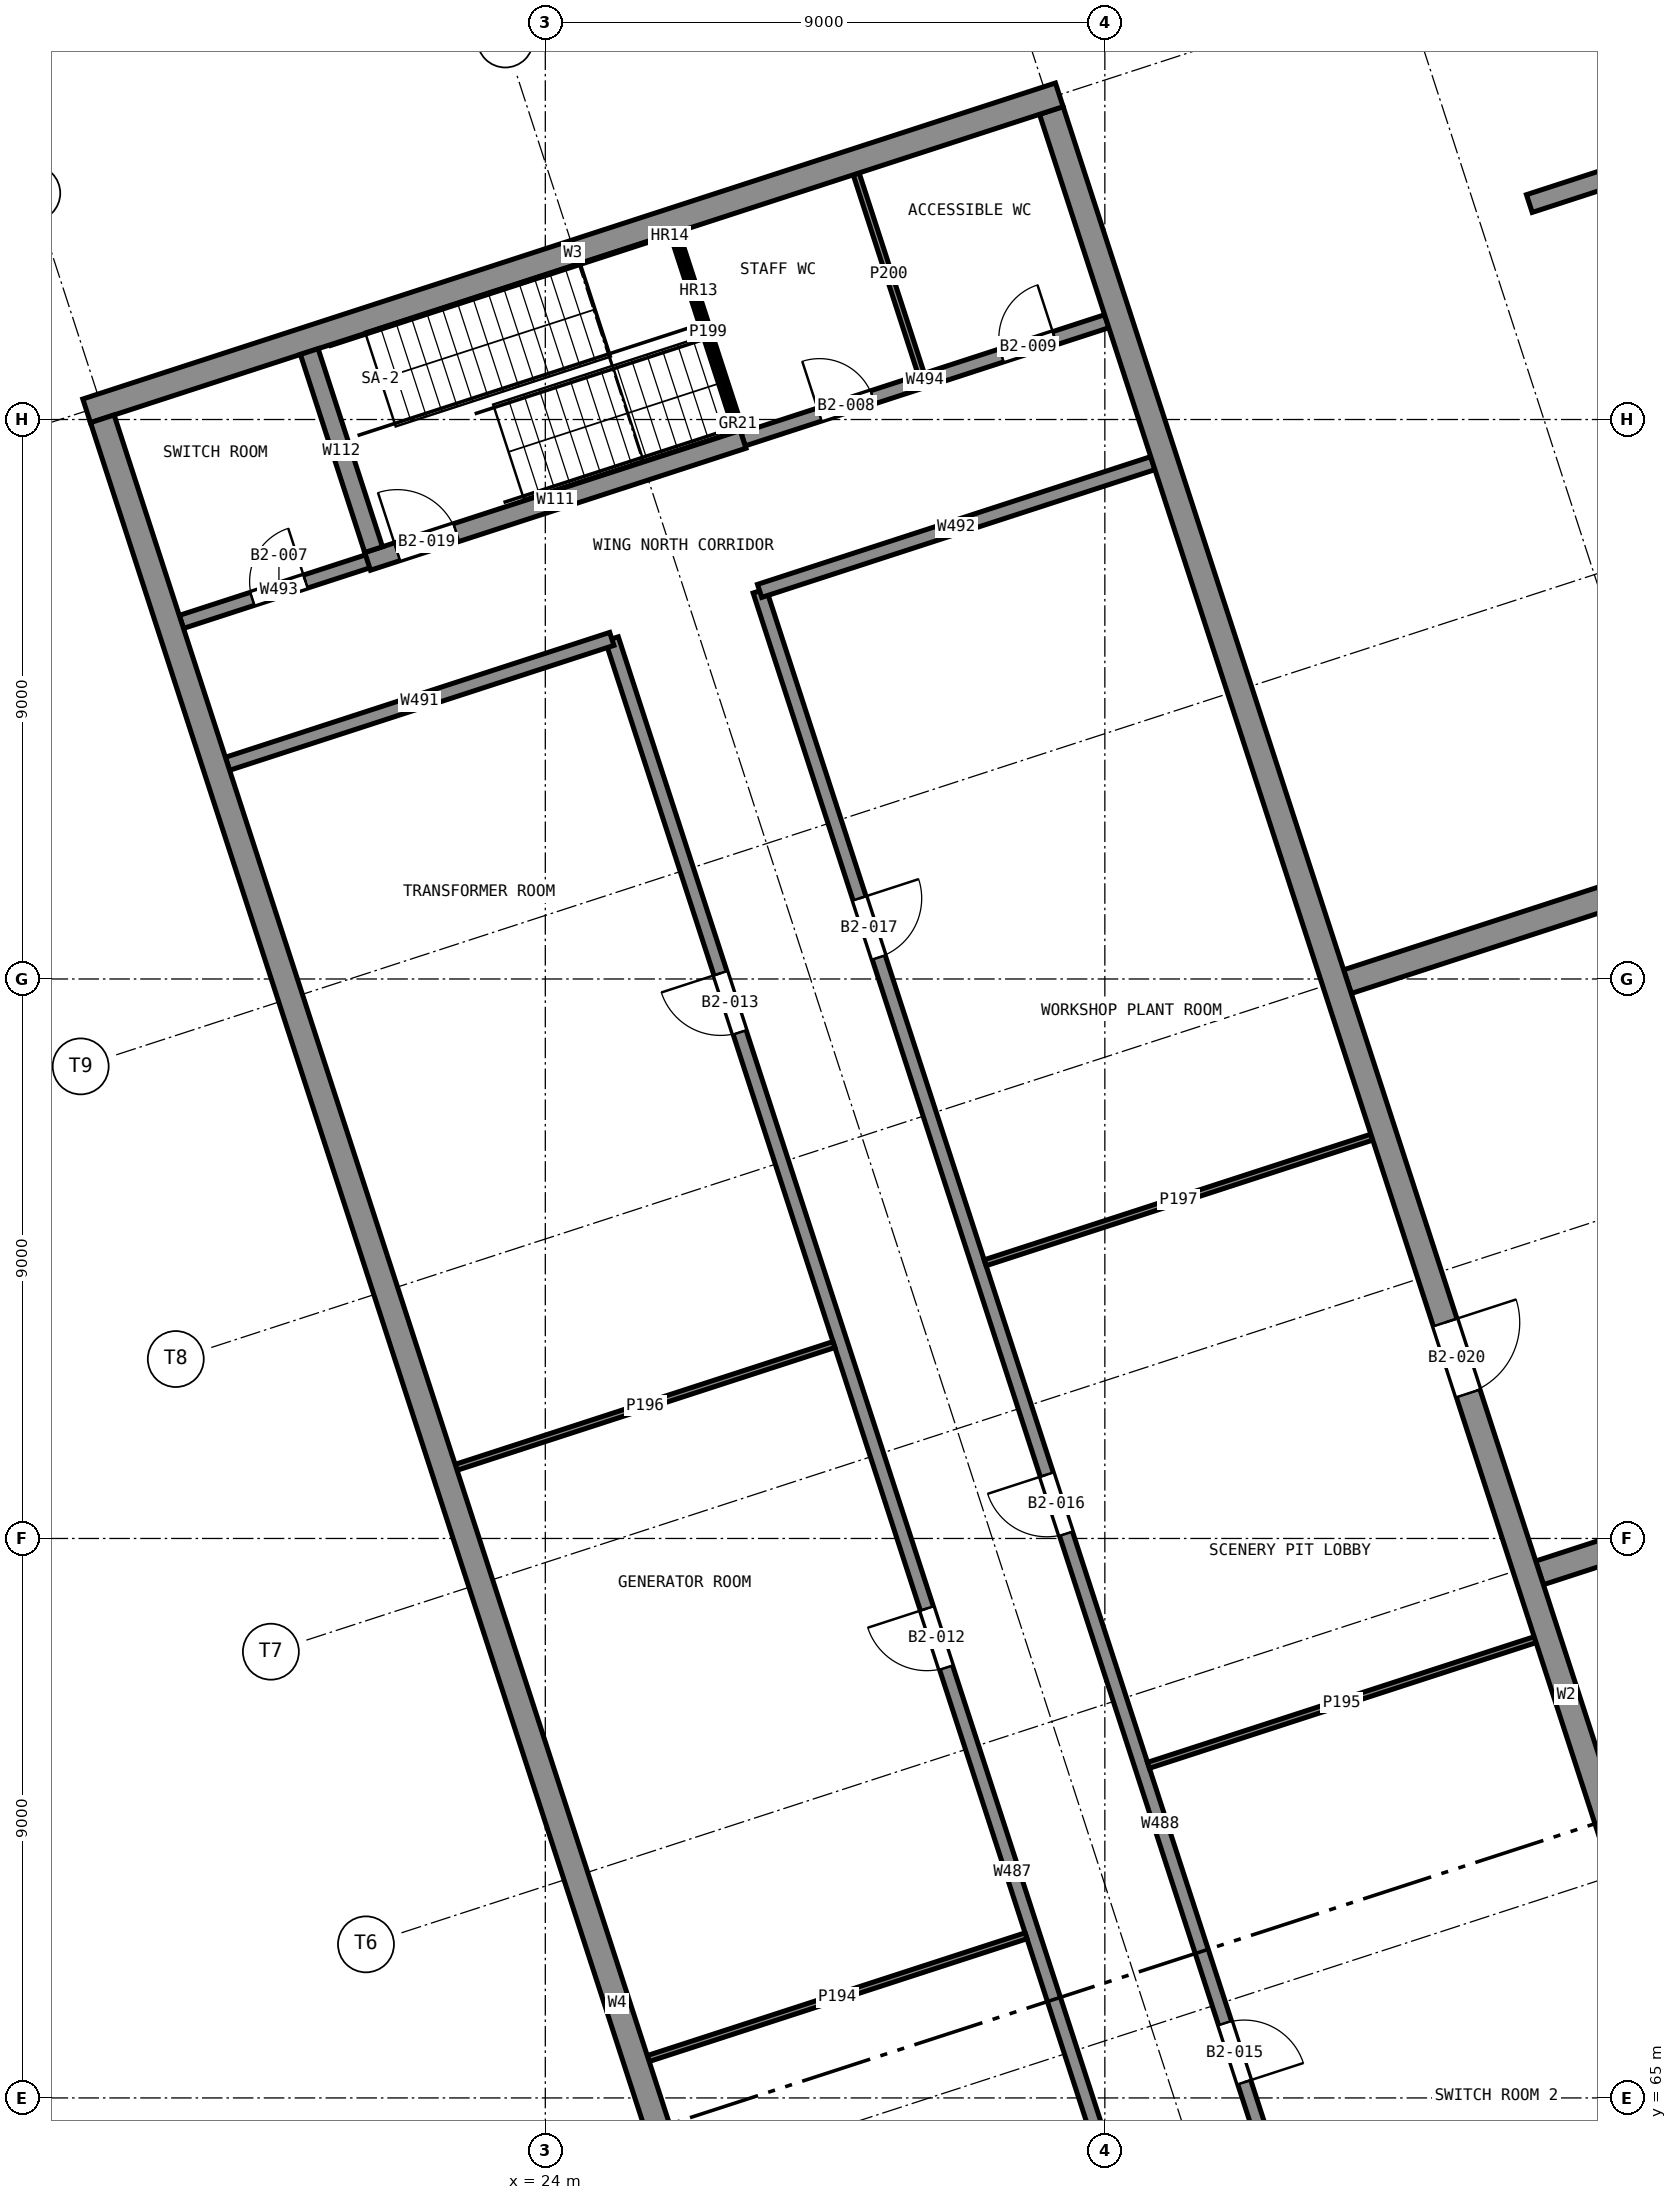
"""IFC4 building model, lengths in metres.
Left out: names, types, materials, properties, quantities, classifications, styles, units other than length and angle.
Written with IfcOpenShell. Run it as: python <this file> out.ifc"""

import sys

from ifc_helpers import new_model, si_unit, direction, frame, frame_2d, origin, place, context, subcontext, project, spatial, rectangle, extrude, element, fill, save


model = new_model("IFC4")
c1 = context("Model", 3, precision=1e-05, world=origin(), true_north=direction((0.0, 1.0)))
c2 = subcontext(c1, "Body", "Model", "MODEL_VIEW")
j1 = project(units=[si_unit("LENGTHUNIT", "METRE"), si_unit("PLANEANGLEUNIT", "RADIAN")], contexts=[c1])
p1 = place(None, origin())
s1 = spatial("IfcSite", under=j1, at=p1, CompositionType="ELEMENT")
p2 = place(p1, origin())
s2 = spatial("IfcBuilding", under=s1, at=p2, CompositionType="ELEMENT")
p3 = place(p2, frame((0.0, 0.0, -10.0)))
s3 = spatial("IfcBuildingStorey", under=s2, at=p3, CompositionType="ELEMENT", Elevation=-10.0)
p4 = place(p3, frame((48.702, 45.994, 0.0), z_axis=(0.0, 0.0, 1.0), x_axis=(-0.309016036191, 0.951056827627, 0.0)))
e1 = element("IfcWall", 1, at=p4, inside=s3, PredefinedType="SOLIDWALL", context=c2, shape_type="SweptSolid", body=[
    extrude(rectangle(XDim=53.6, YDim=0.4, at=frame_2d((26.8, 0.0))), origin(), (0.0, 0.0, 1.0), 5.0),
])
p5 = place(p4, frame((31.9, 0.0, 0.0)))
e2 = element("IfcOpeningElement", 2, at=p5, cuts=e1, PredefinedType="OPENING", context=c2, shape_type="SweptSolid", body=[
    extrude(rectangle(XDim=1.2, YDim=2.1, at=frame_2d((0.6, 1.05))), frame((0.0, 0.21, 0.0), z_axis=(0.0, -1.0, 0.0), x_axis=(1.0, 0.0, 0.0)), (0.0, 0.0, 1.0), 0.42),
])
p6 = place(p3, frame((32.267, 97.223, 0.0), z_axis=(0.0, 0.0, 1.0), x_axis=(-0.951054352744, -0.30902365302, 0.0)))
e3 = element("IfcWall", 3, at=p6, inside=s3, PredefinedType="SOLIDWALL", context=c2, shape_type="SweptSolid", body=[
    extrude(rectangle(XDim=16.45, YDim=0.4, at=frame_2d((8.225, 0.0))), origin(), (0.0, 0.0, 1.0), 5.0),
])
p7 = place(p3, frame((16.874, 92.011, 0.0), z_axis=(0.0, 0.0, 1.0), x_axis=(0.309020156104, -0.951055488981, 0.0)))
e4 = element("IfcWall", 4, at=p7, inside=s3, PredefinedType="SOLIDWALL", context=c2, shape_type="SweptSolid", body=[
    extrude(rectangle(XDim=53.6, YDim=0.4, at=frame_2d((26.8, 0.0))), origin(), (0.0, 0.0, 1.0), 5.0),
])
for number, where, z_axis, x_axis in (
    (5, (39.993, 73.447, 0.0), (0.0, 0.0, 1.0), (0.951, 0.309, 0.0)),
    (6, (46.413, 86.047, 0.0), (0.0, 0.0, 1.0), (-0.951, -0.309, 0.0)),
):
    element("IfcWall", number, at=place(p3, frame(where, z_axis=z_axis, x_axis=x_axis)), inside=s3, PredefinedType="SOLIDWALL", context=c2, shape_type="SweptSolid", body=[
        extrude(rectangle(XDim=10.0, YDim=0.4, at=frame_2d((5.0, 0.0))), origin(), (0.0, 0.0, 1.0), 5.0),
    ])
p8 = place(p3, frame((27.181, 91.68, 0.0), z_axis=(0.0, 0.0, 1.0), x_axis=(-0.951051301895, -0.309033042189, 0.0)))
e7 = element("IfcWall", 7, at=p8, inside=s3, PredefinedType="SOLIDWALL", context=c2, shape_type="SweptSolid", body=[
    extrude(rectangle(XDim=6.35, YDim=0.3, at=frame_2d((3.175, 0.0))), origin(), (0.0, 0.0, 1.0), 4.65),
])
p9 = place(p8, frame((4.85, 0.0, 0.0)))
e8 = element("IfcOpeningElement", 8, at=p9, cuts=e7, PredefinedType="OPENING", context=c2, shape_type="SweptSolid", body=[
    extrude(rectangle(XDim=1.0, YDim=2.1, at=frame_2d((0.5, 1.05))), frame((0.0, 0.16, 0.0), z_axis=(0.0, -1.0, 0.0), x_axis=(1.0, 0.0, 0.0)), (0.0, 0.0, 1.0), 0.32),
])
p10 = place(p3, frame((21.238, 89.907, 0.0), z_axis=(0.0, 0.0, 1.0), x_axis=(-0.309003676349, 0.951060843481, 0.0)))
e9 = element("IfcWall", 9, at=p10, inside=s3, PredefinedType="SOLIDWALL", context=c2, shape_type="SweptSolid", body=[
    extrude(rectangle(XDim=3.35, YDim=0.3, at=frame_2d((1.675, 0.0))), origin(), (0.0, 0.0, 1.0), 4.65),
])
p11 = place(p3, frame((37.956, 48.812, 0.0), z_axis=(0.0, 0.0, 1.0), x_axis=(-0.30901736393, 0.951056396219, 0.0)))
e10 = element("IfcWall", 10, at=p11, inside=s3, PredefinedType="SOLIDWALL", context=c2, shape_type="SweptSolid", body=[
    extrude(rectangle(XDim=41.7, YDim=0.22, at=frame_2d((20.85, 0.0))), origin(), (0.0, 0.0, 1.0), 4.65),
])
p12 = place(p11, frame((2.009, 0.0, 0.0)))
e11 = element("IfcOpeningElement", 11, at=p12, cuts=e10, PredefinedType="OPENING", context=c2, shape_type="SweptSolid", body=[
    extrude(rectangle(XDim=1.0, YDim=2.1, at=frame_2d((0.5, 1.05))), frame((0.0, 0.12, 0.0), z_axis=(0.0, -1.0, 0.0), x_axis=(1.0, 0.0, 0.0)), (0.0, 0.0, 1.0), 0.24),
])
p13 = place(p11, frame((11.495, 0.0, 0.0)))
e12 = element("IfcOpeningElement", 12, at=p13, cuts=e10, PredefinedType="OPENING", context=c2, shape_type="SweptSolid", body=[
    extrude(rectangle(XDim=1.0, YDim=2.1, at=frame_2d((0.5, 1.05))), frame((0.0, 0.12, 0.0), z_axis=(0.0, -1.0, 0.0), x_axis=(1.0, 0.0, 0.0)), (0.0, 0.0, 1.0), 0.24),
])
p14 = place(p11, frame((24.3, 0.0, 0.0)))
e13 = element("IfcOpeningElement", 13, at=p14, cuts=e10, PredefinedType="OPENING", context=c2, shape_type="SweptSolid", body=[
    extrude(rectangle(XDim=1.0, YDim=2.1, at=frame_2d((0.5, 1.05))), frame((0.0, 0.12, 0.0), z_axis=(0.0, -1.0, 0.0), x_axis=(1.0, 0.0, 0.0)), (0.0, 0.0, 1.0), 0.24),
])
p15 = place(p11, frame((35.045, 0.0, 0.0)))
e14 = element("IfcOpeningElement", 14, at=p15, cuts=e10, PredefinedType="OPENING", context=c2, shape_type="SweptSolid", body=[
    extrude(rectangle(XDim=1.0, YDim=2.1, at=frame_2d((0.5, 1.05))), frame((0.0, 0.12, 0.0), z_axis=(0.0, -1.0, 0.0), x_axis=(1.0, 0.0, 0.0)), (0.0, 0.0, 1.0), 0.24),
])
p16 = place(p3, frame((40.333, 49.584, 0.0), z_axis=(0.0, 0.0, 1.0), x_axis=(-0.309015643281, 0.951056955291, 0.0)))
e15 = element("IfcWall", 15, at=p16, inside=s3, PredefinedType="SOLIDWALL", context=c2, shape_type="SweptSolid", body=[
    extrude(rectangle(XDim=41.7, YDim=0.22, at=frame_2d((20.85, 0.0))), origin(), (0.0, 0.0, 1.0), 4.65),
])
p17 = place(p16, frame((5.575, 0.0, 0.0)))
e16 = element("IfcOpeningElement", 16, at=p17, cuts=e15, PredefinedType="OPENING", context=c2, shape_type="SweptSolid", body=[
    extrude(rectangle(XDim=1.0, YDim=2.1, at=frame_2d((0.5, 1.05))), frame((0.0, 0.12, 0.0), z_axis=(0.0, -1.0, 0.0), x_axis=(1.0, 0.0, 0.0)), (0.0, 0.0, 1.0), 0.24),
])
p18 = place(p16, frame((16.475, 0.0, 0.0)))
e17 = element("IfcOpeningElement", 17, at=p18, cuts=e15, PredefinedType="OPENING", context=c2, shape_type="SweptSolid", body=[
    extrude(rectangle(XDim=1.0, YDim=2.1, at=frame_2d((0.5, 1.05))), frame((0.0, 0.12, 0.0), z_axis=(0.0, -1.0, 0.0), x_axis=(1.0, 0.0, 0.0)), (0.0, 0.0, 1.0), 0.24),
])
p19 = place(p16, frame((25.752, 0.0, 0.0)))
e18 = element("IfcOpeningElement", 18, at=p19, cuts=e15, PredefinedType="OPENING", context=c2, shape_type="SweptSolid", body=[
    extrude(rectangle(XDim=1.0, YDim=2.1, at=frame_2d((0.5, 1.05))), frame((0.0, 0.12, 0.0), z_axis=(0.0, -1.0, 0.0), x_axis=(1.0, 0.0, 0.0)), (0.0, 0.0, 1.0), 0.24),
])
p20 = place(p16, frame((35.5, 0.0, 0.0)))
e19 = element("IfcOpeningElement", 19, at=p20, cuts=e15, PredefinedType="OPENING", context=c2, shape_type="SweptSolid", body=[
    extrude(rectangle(XDim=1.0, YDim=2.1, at=frame_2d((0.5, 1.05))), frame((0.0, 0.12, 0.0), z_axis=(0.0, -1.0, 0.0), x_axis=(1.0, 0.0, 0.0)), (0.0, 0.0, 1.0), 0.24),
])
p21 = place(p3, frame((18.888, 86.462, 0.0), z_axis=(0.0, 0.0, 1.0), x_axis=(0.951059735424, 0.30900708674, 0.0)))
e20 = element("IfcWall", 20, at=p21, inside=s3, PredefinedType="SOLIDWALL", context=c2, shape_type="SweptSolid", body=[
    extrude(rectangle(XDim=6.5, YDim=0.22, at=frame_2d((3.25, 0.0))), origin(), (0.0, 0.0, 1.0), 4.65),
])
p22 = place(p3, frame((27.447, 89.243, 0.0), z_axis=(0.0, 0.0, 1.0), x_axis=(0.95105699893, 0.309015508975, 0.0)))
e21 = element("IfcWall", 21, at=p22, inside=s3, PredefinedType="SOLIDWALL", context=c2, shape_type="SweptSolid", body=[
    extrude(rectangle(XDim=6.65, YDim=0.22, at=frame_2d((3.325, 0.0))), origin(), (0.0, 0.0, 1.0), 4.65),
])
p23 = place(p3, frame((18.146, 88.744, 0.0), z_axis=(0.0, 0.0, 1.0), x_axis=(0.951053095941, 0.309027520945, 0.0)))
e22 = element("IfcWall", 22, at=p23, inside=s3, PredefinedType="SOLIDWALL", context=c2, shape_type="SweptSolid", body=[
    extrude(rectangle(XDim=3.3, YDim=0.22, at=frame_2d((1.65, 0.0))), origin(), (0.0, 0.0, 1.0), 4.65),
])
p24 = place(p23, frame((1.2, 0.0, 0.0)))
e23 = element("IfcOpeningElement", 23, at=p24, cuts=e22, PredefinedType="OPENING", context=c2, shape_type="SweptSolid", body=[
    extrude(rectangle(XDim=0.9, YDim=2.1, at=frame_2d((0.45, 1.05))), frame((0.0, 0.12, 0.0), z_axis=(0.0, -1.0, 0.0), x_axis=(1.0, 0.0, 0.0)), (0.0, 0.0, 1.0), 0.24),
])
p25 = place(p3, frame((27.181, 91.68, 0.0), z_axis=(0.0, 0.0, 1.0), x_axis=(0.951061487132, 0.309001695293, 0.0)))
e24 = element("IfcWall", 24, at=p25, inside=s3, PredefinedType="SOLIDWALL", context=c2, shape_type="SweptSolid", body=[
    extrude(rectangle(XDim=6.15, YDim=0.22, at=frame_2d((3.075, 0.0))), origin(), (0.0, 0.0, 1.0), 4.65),
])
p26 = place(p25, frame((1.293, 0.0, 0.0)))
e25 = element("IfcOpeningElement", 25, at=p26, cuts=e24, PredefinedType="OPENING", context=c2, shape_type="SweptSolid", body=[
    extrude(rectangle(XDim=0.9, YDim=2.1, at=frame_2d((0.45, 1.05))), frame((0.0, 0.12, 0.0), z_axis=(0.0, -1.0, 0.0), x_axis=(1.0, 0.0, 0.0)), (0.0, 0.0, 1.0), 0.24),
])
p27 = place(p25, frame((4.371, 0.0, 0.0)))
e26 = element("IfcOpeningElement", 26, at=p27, cuts=e24, PredefinedType="OPENING", context=c2, shape_type="SweptSolid", body=[
    extrude(rectangle(XDim=0.9, YDim=2.1, at=frame_2d((0.45, 1.05))), frame((0.0, 0.12, 0.0), z_axis=(0.0, -1.0, 0.0), x_axis=(1.0, 0.0, 0.0)), (0.0, 0.0, 1.0), 0.24),
])
p28 = place(p3, frame((25.655, 65.634, 0.0), z_axis=(0.0, 0.0, 1.0), x_axis=(0.951055405517, 0.309020412977, 0.0)))
e27 = element("IfcWall", 27, at=p28, inside=s3, PredefinedType="PARTITIONING", context=c2, shape_type="SweptSolid", body=[
    extrude(rectangle(XDim=6.39, YDim=0.1, at=frame_2d((3.195, 0.0))), origin(), (0.0, 0.0, 1.0), 4.65),
])
p29 = place(p3, frame((33.701, 70.351, 0.0), z_axis=(0.0, 0.0, 1.0), x_axis=(0.951052722107, 0.30902867144, 0.0)))
e28 = element("IfcWall", 28, at=p29, inside=s3, PredefinedType="PARTITIONING", context=c2, shape_type="SweptSolid", body=[
    extrude(rectangle(XDim=6.54, YDim=0.1, at=frame_2d((3.27, 0.0))), origin(), (0.0, 0.0, 1.0), 4.65),
])
p30 = place(p3, frame((22.565, 75.144, 0.0), z_axis=(0.0, 0.0, 1.0), x_axis=(0.951055405517, 0.309020412977, 0.0)))
e29 = element("IfcWall", 29, at=p30, inside=s3, PredefinedType="PARTITIONING", context=c2, shape_type="SweptSolid", body=[
    extrude(rectangle(XDim=6.39, YDim=0.1, at=frame_2d((3.195, 0.0))), origin(), (0.0, 0.0, 1.0), 4.65),
])
p31 = place(p3, frame((31.075, 78.435, 0.0), z_axis=(0.0, 0.0, 1.0), x_axis=(0.951056287011, 0.309017700038, 0.0)))
e30 = element("IfcWall", 30, at=p31, inside=s3, PredefinedType="PARTITIONING", context=c2, shape_type="SweptSolid", body=[
    extrude(rectangle(XDim=6.54, YDim=0.1, at=frame_2d((3.27, 0.0))), origin(), (0.0, 0.0, 1.0), 4.65),
])
p32 = place(p3, frame((27.135, 91.823, 0.0), z_axis=(0.0, 0.0, 1.0), x_axis=(-0.309003676349, 0.951060843481, 0.0)))
e31 = element("IfcWall", 31, at=p32, inside=s3, PredefinedType="PARTITIONING", context=c2, shape_type="SweptSolid", body=[
    extrude(rectangle(XDim=3.35, YDim=0.1, at=frame_2d((1.675, 0.0))), origin(), (0.0, 0.0, 1.0), 4.65),
])
p33 = place(p3, frame((30.048, 92.727, 0.0), z_axis=(0.0, 0.0, 1.0), x_axis=(-0.309024191767, 0.951054177691, 0.0)))
e32 = element("IfcWall", 32, at=p33, inside=s3, PredefinedType="PARTITIONING", context=c2, shape_type="SweptSolid", body=[
    extrude(rectangle(XDim=3.39, YDim=0.1, at=frame_2d((1.695, 0.0))), origin(), (0.0, 0.0, 1.0), 4.65),
])
p34 = place(p3, frame((39.828, 95.474, 0.0), z_axis=(0.0, 0.0, 1.0), x_axis=(0.951058391285, 0.309011223689, 0.0)))
e33 = element("IfcWall", 33, at=p34, inside=s3, PredefinedType="SOLIDWALL", context=c2, shape_type="SweptSolid", body=[
    extrude(rectangle(XDim=16.3, YDim=0.3, at=frame_2d((8.15, 0.0))), origin(), (0.0, 0.0, 1.0), 5.0),
])
p35 = place(p24, origin())
e34 = element("IfcDoor", 34, at=p35, inside=s3, OperationType="SINGLE_SWING_LEFT", PredefinedType="DOOR", context=c2, shape_type="SweptSolid", body=[
    extrude(rectangle(XDim=0.9, YDim=2.1, at=frame_2d((0.45, 1.05))), frame((0.0, 0.025, 0.0), z_axis=(0.0, -1.0, 0.0), x_axis=(1.0, 0.0, 0.0)), (0.0, 0.0, 1.0), 0.05),
])
fill(e23, e34)
p36 = place(p26, origin())
e35 = element("IfcDoor", 35, at=p36, inside=s3, OperationType="SINGLE_SWING_RIGHT", PredefinedType="DOOR", context=c2, shape_type="SweptSolid", body=[
    extrude(rectangle(XDim=0.9, YDim=2.1, at=frame_2d((0.45, 1.05))), frame((0.0, 0.025, 0.0), z_axis=(0.0, -1.0, 0.0), x_axis=(1.0, 0.0, 0.0)), (0.0, 0.0, 1.0), 0.05),
])
fill(e25, e35)
p37 = place(p27, origin())
e36 = element("IfcDoor", 36, at=p37, inside=s3, OperationType="SINGLE_SWING_LEFT", PredefinedType="DOOR", context=c2, shape_type="SweptSolid", body=[
    extrude(rectangle(XDim=0.9, YDim=2.1, at=frame_2d((0.45, 1.05))), frame((0.0, 0.025, 0.0), z_axis=(0.0, -1.0, 0.0), x_axis=(1.0, 0.0, 0.0)), (0.0, 0.0, 1.0), 0.05),
])
fill(e26, e36)
p38 = place(p14, origin())
e37 = element("IfcDoor", 37, at=p38, inside=s3, OperationType="SINGLE_SWING_LEFT", PredefinedType="DOOR", context=c2, shape_type="SweptSolid", body=[
    extrude(rectangle(XDim=1.0, YDim=2.1, at=frame_2d((0.5, 1.05))), frame((0.0, 0.025, 0.0), z_axis=(0.0, -1.0, 0.0), x_axis=(1.0, 0.0, 0.0)), (0.0, 0.0, 1.0), 0.05),
])
fill(e13, e37)
p39 = place(p15, origin())
e38 = element("IfcDoor", 38, at=p39, inside=s3, OperationType="SINGLE_SWING_LEFT", PredefinedType="DOOR", context=c2, shape_type="SweptSolid", body=[
    extrude(rectangle(XDim=1.0, YDim=2.1, at=frame_2d((0.5, 1.05))), frame((0.0, 0.025, 0.0), z_axis=(0.0, -1.0, 0.0), x_axis=(1.0, 0.0, 0.0)), (0.0, 0.0, 1.0), 0.05),
])
fill(e14, e38)
p40 = place(p18, frame((1.0, 0.0, 0.0), z_axis=(0.0, 0.0, 1.0), x_axis=(-1.0, 0.0, 0.0)))
e39 = element("IfcDoor", 39, at=p40, inside=s3, OperationType="SINGLE_SWING_LEFT", PredefinedType="DOOR", context=c2, shape_type="SweptSolid", body=[
    extrude(rectangle(XDim=1.0, YDim=2.1, at=frame_2d((0.5, 1.05))), frame((0.0, 0.025, 0.0), z_axis=(0.0, -1.0, 0.0), x_axis=(1.0, 0.0, 0.0)), (0.0, 0.0, 1.0), 0.05),
])
fill(e17, e39)
p41 = place(p19, origin())
e40 = element("IfcDoor", 40, at=p41, inside=s3, OperationType="SINGLE_SWING_LEFT", PredefinedType="DOOR", context=c2, shape_type="SweptSolid", body=[
    extrude(rectangle(XDim=1.0, YDim=2.1, at=frame_2d((0.5, 1.05))), frame((0.0, 0.025, 0.0), z_axis=(0.0, -1.0, 0.0), x_axis=(1.0, 0.0, 0.0)), (0.0, 0.0, 1.0), 0.05),
])
fill(e18, e40)
p42 = place(p20, frame((1.0, 0.0, 0.0), z_axis=(0.0, 0.0, 1.0), x_axis=(-1.0, 0.0, 0.0)))
e41 = element("IfcDoor", 41, at=p42, inside=s3, OperationType="SINGLE_SWING_RIGHT", PredefinedType="DOOR", context=c2, shape_type="SweptSolid", body=[
    extrude(rectangle(XDim=1.0, YDim=2.1, at=frame_2d((0.5, 1.05))), frame((0.0, 0.025, 0.0), z_axis=(0.0, -1.0, 0.0), x_axis=(1.0, 0.0, 0.0)), (0.0, 0.0, 1.0), 0.05),
])
fill(e19, e41)
p43 = place(p9, frame((1.0, 0.0, 0.0), z_axis=(0.0, 0.0, 1.0), x_axis=(-1.0, 0.0, 0.0)))
e42 = element("IfcDoor", 42, at=p43, inside=s3, OperationType="SINGLE_SWING_RIGHT", PredefinedType="DOOR", context=c2, shape_type="SweptSolid", body=[
    extrude(rectangle(XDim=1.0, YDim=2.1, at=frame_2d((0.5, 1.05))), frame((0.0, 0.025, 0.0), z_axis=(0.0, -1.0, 0.0), x_axis=(1.0, 0.0, 0.0)), (0.0, 0.0, 1.0), 0.05),
])
fill(e8, e42)
p44 = place(p5, frame((1.2, 0.0, 0.0), z_axis=(0.0, 0.0, 1.0), x_axis=(-1.0, 0.0, 0.0)))
e43 = element("IfcDoor", 43, at=p44, inside=s3, OperationType="SINGLE_SWING_RIGHT", PredefinedType="DOOR", context=c2, shape_type="SweptSolid", body=[
    extrude(rectangle(XDim=1.2, YDim=2.1, at=frame_2d((0.6, 1.05))), frame((0.0, 0.025, 0.0), z_axis=(0.0, -1.0, 0.0), x_axis=(1.0, 0.0, 0.0)), (0.0, 0.0, 1.0), 0.05),
])
fill(e2, e43)
save(model, sys.argv[1])
